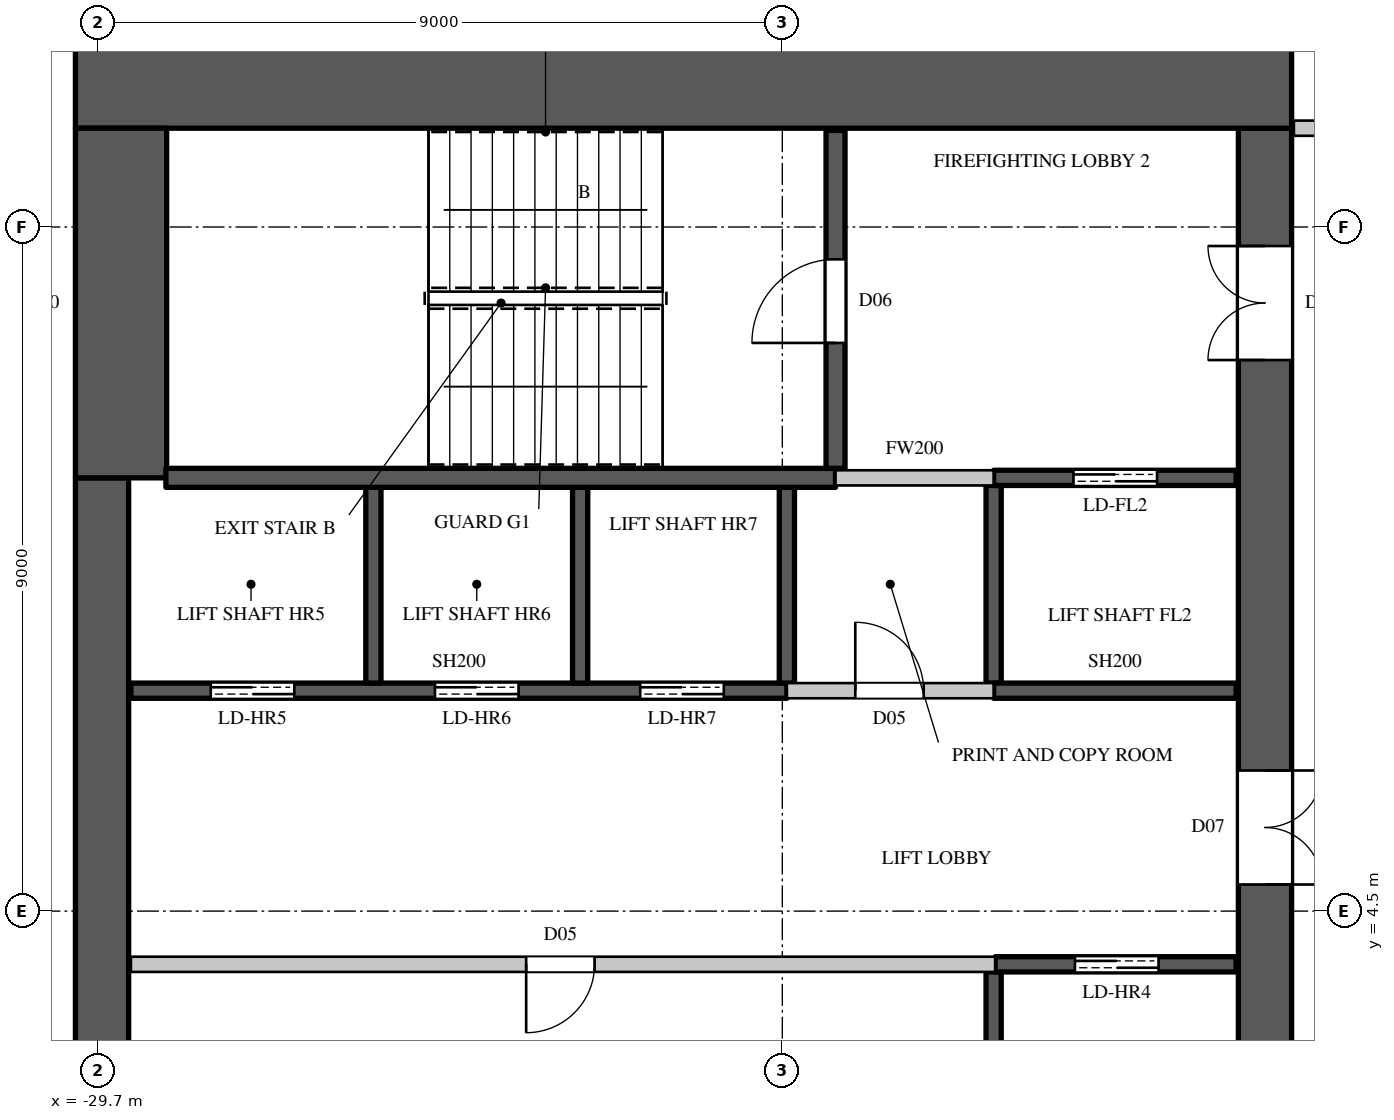
"""IFC4 building model, lengths in metres.
Left out: names, types, materials, properties, quantities, classifications, styles, units other than length and angle.
Written with IfcOpenShell. Run it as: python <this file> out.ifc"""

import sys

from ifc_helpers import new_model, si_unit, direction, frame, frame_2d, origin, place, context, subcontext, project, spatial, rectangle, extrude, element, fill, save


model = new_model("IFC4")
c1 = context("Model", 3, precision=1e-05, world=origin(), true_north=direction((0.0, 1.0)))
c2 = subcontext(c1, "Body", "Model", "MODEL_VIEW")
j1 = project(units=[si_unit("LENGTHUNIT", "METRE"), si_unit("PLANEANGLEUNIT", "RADIAN")], contexts=[c1])
p1 = place(None, origin())
s1 = spatial("IfcSite", under=j1, at=p1, CompositionType="ELEMENT")
p2 = place(p1, origin())
s2 = spatial("IfcBuilding", under=s1, at=p2, CompositionType="ELEMENT")
p3 = place(p2, frame((0.0, 0.0, 284.4)))
s3 = spatial("IfcBuildingStorey", under=s2, at=p3, CompositionType="ELEMENT", Elevation=284.4)
p4 = place(p3, frame((-30.0, 15.4, 0.0), z_axis=(0.0, 0.0, 1.0), x_axis=(1.0, 0.0, 0.0)))
e1 = element("IfcWall", 1, at=p4, inside=s3, PredefinedType="SHEAR", context=c2, shape_type="SweptSolid", body=[
    extrude(rectangle(XDim=16.0, YDim=1.2, at=frame_2d((8.0, 0.0))), origin(), (0.0, 0.0, 1.0), 4.1),
])
p5 = place(p3, frame((-14.35, -14.8, 0.0), z_axis=(0.0, 0.0, 1.0), x_axis=(0.0, 1.0, 0.0)))
e2 = element("IfcWall", 2, at=p5, inside=s3, PredefinedType="SHEAR", context=c2, shape_type="SweptSolid", body=[
    extrude(rectangle(XDim=29.6, YDim=0.7, at=frame_2d((14.8, 0.0))), origin(), (0.0, 0.0, 1.0), 4.1),
])
p6 = place(p5, frame((1.55, 0.0, 0.0)))
e3 = element("IfcOpeningElement", 3, at=p6, cuts=e2, PredefinedType="OPENING", context=c2, shape_type="SweptSolid", body=[
    extrude(rectangle(XDim=1.5, YDim=2.4, at=frame_2d((0.75, 1.2))), frame((0.0, 0.36, 0.0), z_axis=(0.0, -1.0, 0.0), x_axis=(1.0, 0.0, 0.0)), (0.0, 0.0, 1.0), 0.72),
])
p7 = place(p5, frame((26.55, 0.0, 0.0)))
e4 = element("IfcOpeningElement", 4, at=p7, cuts=e2, PredefinedType="OPENING", context=c2, shape_type="SweptSolid", body=[
    extrude(rectangle(XDim=1.5, YDim=2.4, at=frame_2d((0.75, 1.2))), frame((0.0, 0.36, 0.0), z_axis=(0.0, -1.0, 0.0), x_axis=(1.0, 0.0, 0.0)), (0.0, 0.0, 1.0), 0.72),
])
p8 = place(p5, frame((8.45, 0.0, 0.0)))
e5 = element("IfcOpeningElement", 5, at=p8, cuts=e2, PredefinedType="OPENING", context=c2, shape_type="SweptSolid", body=[
    extrude(rectangle(XDim=1.5, YDim=2.4, at=frame_2d((0.75, 1.2))), frame((0.0, 0.36, 0.0), z_axis=(0.0, -1.0, 0.0), x_axis=(1.0, 0.0, 0.0)), (0.0, 0.0, 1.0), 0.72),
])
p9 = place(p5, frame((19.65, 0.0, 0.0)))
e6 = element("IfcOpeningElement", 6, at=p9, cuts=e2, PredefinedType="OPENING", context=c2, shape_type="SweptSolid", body=[
    extrude(rectangle(XDim=1.5, YDim=2.4, at=frame_2d((0.75, 1.2))), frame((0.0, 0.36, 0.0), z_axis=(0.0, -1.0, 0.0), x_axis=(1.0, 0.0, 0.0)), (0.0, 0.0, 1.0), 0.72),
])
p10 = place(p5, frame((14.5, 0.0, 0.0)))
e7 = element("IfcOpeningElement", 7, at=p10, cuts=e2, PredefinedType="OPENING", context=c2, shape_type="SweptSolid", body=[
    extrude(rectangle(XDim=0.6, YDim=2.0, at=frame_2d((0.3, 1.0))), frame((0.0, 0.36, 0.0), z_axis=(0.0, -1.0, 0.0), x_axis=(1.0, 0.0, 0.0)), (0.0, 0.0, 1.0), 0.72),
])
p11 = place(p3, frame((-29.65, -10.2, 0.0), z_axis=(0.0, 0.0, 1.0), x_axis=(0.0, 1.0, 0.0)))
e8 = element("IfcWall", 8, at=p11, inside=s3, PredefinedType="SHEAR", context=c2, shape_type="SweptSolid", body=[
    extrude(rectangle(XDim=20.4, YDim=0.7, at=frame_2d((10.2, 0.0))), origin(), (0.0, 0.0, 1.0), 4.1),
])
p12 = place(p3, frame((-29.4, 10.2, 0.0), z_axis=(0.0, 0.0, 1.0), x_axis=(0.0, 1.0, 0.0)))
e9 = element("IfcWall", 9, at=p12, inside=s3, PredefinedType="SHEAR", context=c2, shape_type="SweptSolid", body=[
    extrude(rectangle(XDim=4.6, YDim=1.2, at=frame_2d((2.3, 0.0))), origin(), (0.0, 0.0, 1.0), 4.1),
])
p13 = place(p3, frame((-20.64, 7.4, 0.0), z_axis=(0.0, 0.0, 1.0), x_axis=(1.0, 0.0, 0.0)))
e10 = element("IfcWall", 10, at=p13, inside=s3, PredefinedType="PARTITIONING", context=c2, shape_type="SweptSolid", body=[
    extrude(rectangle(XDim=2.72, YDim=0.2, at=frame_2d((1.36, 0.0))), origin(), (0.0, 0.0, 1.0), 3.8),
])
p14 = place(p13, frame((0.9, 0.0, 0.0)))
e11 = element("IfcOpeningElement", 11, at=p14, cuts=e10, PredefinedType="OPENING", context=c2, shape_type="SweptSolid", body=[
    extrude(rectangle(XDim=0.9, YDim=2.2, at=frame_2d((0.45, 1.1))), frame((0.0, 0.11, 0.0), z_axis=(0.0, -1.0, 0.0), x_axis=(1.0, 0.0, 0.0)), (0.0, 0.0, 1.0), 0.22),
])
p15 = place(p3, frame((-20.0, 10.2, 0.0), z_axis=(0.0, 0.0, 1.0), x_axis=(1.0, 0.0, 0.0)))
e12 = element("IfcWall", 12, at=p15, inside=s3, PredefinedType="PARTITIONING", context=c2, shape_type="SweptSolid", body=[
    extrude(rectangle(XDim=2.08, YDim=0.2, at=frame_2d((1.04, 0.0))), origin(), (0.0, 0.0, 1.0), 3.8),
])
p16 = place(p3, frame((-13.97, 14.8, 0.0), z_axis=(0.0, 0.0, 1.0), x_axis=(1.0, 0.0, 0.0)))
e13 = element("IfcWall", 13, at=p16, inside=s3, PredefinedType="PARTITIONING", context=c2, shape_type="SweptSolid", body=[
    extrude(rectangle(XDim=2.87, YDim=0.2, at=frame_2d((1.435, 0.0))), origin(), (0.0, 0.0, 1.0), 3.8),
])
p17 = place(p3, frame((-29.27, 3.8, 0.0), z_axis=(0.0, 0.0, 1.0), x_axis=(1.0, 0.0, 0.0)))
e14 = element("IfcWall", 14, at=p17, inside=s3, PredefinedType="PARTITIONING", context=c2, shape_type="SweptSolid", body=[
    extrude(rectangle(XDim=11.37, YDim=0.2, at=frame_2d((5.685, 0.0))), origin(), (0.0, 0.0, 1.0), 3.8),
])
p18 = place(p17, frame((5.2, 0.0, 0.0)))
e15 = element("IfcOpeningElement", 15, at=p18, cuts=e14, PredefinedType="OPENING", context=c2, shape_type="SweptSolid", body=[
    extrude(rectangle(XDim=0.9, YDim=2.2, at=frame_2d((0.45, 1.1))), frame((0.0, 0.11, 0.0), z_axis=(0.0, -1.0, 0.0), x_axis=(1.0, 0.0, 0.0)), (0.0, 0.0, 1.0), 0.22),
])
p19 = place(p3, frame((-29.27, 7.4, 0.0), z_axis=(0.0, 0.0, 1.0), x_axis=(1.0, 0.0, 0.0)))
e16 = element("IfcWall", 16, at=p19, inside=s3, PredefinedType="SHEAR", context=c2, shape_type="SweptSolid", body=[
    extrude(rectangle(XDim=8.63, YDim=0.2, at=frame_2d((4.315, 0.0))), origin(), (0.0, 0.0, 1.0), 3.8),
])
p20 = place(p19, frame((1.05, 0.0, 0.0)))
e17 = element("IfcOpeningElement", 17, at=p20, cuts=e16, PredefinedType="OPENING", context=c2, shape_type="SweptSolid", body=[
    extrude(rectangle(XDim=1.1, YDim=2.2, at=frame_2d((0.55, 1.1))), frame((0.0, 0.11, 0.0), z_axis=(0.0, -1.0, 0.0), x_axis=(1.0, 0.0, 0.0)), (0.0, 0.0, 1.0), 0.22),
])
p21 = place(p19, frame((4.0, 0.0, 0.0)))
e18 = element("IfcOpeningElement", 18, at=p21, cuts=e16, PredefinedType="OPENING", context=c2, shape_type="SweptSolid", body=[
    extrude(rectangle(XDim=1.1, YDim=2.2, at=frame_2d((0.55, 1.1))), frame((0.0, 0.11, 0.0), z_axis=(0.0, -1.0, 0.0), x_axis=(1.0, 0.0, 0.0)), (0.0, 0.0, 1.0), 0.22),
])
p22 = place(p19, frame((6.7, 0.0, 0.0)))
e19 = element("IfcOpeningElement", 19, at=p22, cuts=e16, PredefinedType="OPENING", context=c2, shape_type="SweptSolid", body=[
    extrude(rectangle(XDim=1.1, YDim=2.2, at=frame_2d((0.55, 1.1))), frame((0.0, 0.11, 0.0), z_axis=(0.0, -1.0, 0.0), x_axis=(1.0, 0.0, 0.0)), (0.0, 0.0, 1.0), 0.22),
])
for number, where, z_axis, x_axis in (
    (20, (-26.08, 7.5, 0.0), (0.0, 0.0, 1.0), (0.0, 1.0, 0.0)),
    (21, (-23.36, 7.5, 0.0), (0.0, 0.0, 1.0), (0.0, 1.0, 0.0)),
):
    element("IfcWall", number, at=place(p3, frame(where, z_axis=z_axis, x_axis=x_axis)), inside=s3, PredefinedType="SHEAR", context=c2, shape_type="SweptSolid", body=[
        extrude(rectangle(XDim=2.575, YDim=0.2, at=frame_2d((1.288, 0.0))), origin(), (0.0, 0.0, 1.0), 4.1),
    ])
p23 = place(p3, frame((-20.64, 7.5, 0.0), z_axis=(0.0, 0.0, 1.0), x_axis=(0.0, 1.0, 0.0)))
e22 = element("IfcWall", 22, at=p23, inside=s3, PredefinedType="SHEAR", context=c2, shape_type="SweptSolid", body=[
    extrude(rectangle(XDim=2.575, YDim=0.2, at=frame_2d((1.288, 0.0))), origin(), (0.0, 0.0, 1.0), 3.8),
])
p24 = place(p3, frame((-17.92, 1.1, 0.0), z_axis=(0.0, 0.0, 1.0), x_axis=(0.0, 1.0, 0.0)))
e23 = element("IfcWall", 23, at=p24, inside=s3, PredefinedType="SHEAR", context=c2, shape_type="SweptSolid", body=[
    extrude(rectangle(XDim=2.6, YDim=0.2, at=frame_2d((1.3, 0.0))), origin(), (0.0, 0.0, 1.0), 3.8),
])
p25 = place(p3, frame((-17.9, 3.8, 0.0), z_axis=(0.0, 0.0, 1.0), x_axis=(1.0, 0.0, 0.0)))
e24 = element("IfcWall", 24, at=p25, inside=s3, PredefinedType="SHEAR", context=c2, shape_type="SweptSolid", body=[
    extrude(rectangle(XDim=3.17, YDim=0.2, at=frame_2d((1.585, 0.0))), origin(), (0.0, 0.0, 1.0), 3.8),
])
p26 = place(p25, frame((1.05, 0.0, 0.0)))
e25 = element("IfcOpeningElement", 25, at=p26, cuts=e24, PredefinedType="OPENING", context=c2, shape_type="SweptSolid", body=[
    extrude(rectangle(XDim=1.1, YDim=2.2, at=frame_2d((0.55, 1.1))), frame((0.0, 0.11, 0.0), z_axis=(0.0, -1.0, 0.0), x_axis=(1.0, 0.0, 0.0)), (0.0, 0.0, 1.0), 0.22),
])
p27 = place(p3, frame((-17.92, 7.5, 0.0), z_axis=(0.0, 0.0, 1.0), x_axis=(0.0, 1.0, 0.0)))
e26 = element("IfcWall", 26, at=p27, inside=s3, PredefinedType="SHEAR", context=c2, shape_type="SweptSolid", body=[
    extrude(rectangle(XDim=2.6, YDim=0.2, at=frame_2d((1.3, 0.0))), origin(), (0.0, 0.0, 1.0), 3.8),
])
p28 = place(p3, frame((-17.92, 7.4, 0.0), z_axis=(0.0, 0.0, 1.0), x_axis=(1.0, 0.0, 0.0)))
e27 = element("IfcWall", 27, at=p28, inside=s3, PredefinedType="SHEAR", context=c2, shape_type="SweptSolid", body=[
    extrude(rectangle(XDim=3.19, YDim=0.2, at=frame_2d((1.595, 0.0))), origin(), (0.0, 0.0, 1.0), 3.8),
])
p29 = place(p3, frame((-17.92, 10.2, 0.0), z_axis=(0.0, 0.0, 1.0), x_axis=(1.0, 0.0, 0.0)))
e28 = element("IfcWall", 28, at=p29, inside=s3, PredefinedType="SHEAR", context=c2, shape_type="SweptSolid", body=[
    extrude(rectangle(XDim=3.19, YDim=0.2, at=frame_2d((1.595, 0.0))), origin(), (0.0, 0.0, 1.0), 3.8),
])
p30 = place(p29, frame((1.05, 0.0, 0.0)))
e29 = element("IfcOpeningElement", 29, at=p30, cuts=e28, PredefinedType="OPENING", context=c2, shape_type="SweptSolid", body=[
    extrude(rectangle(XDim=1.1, YDim=2.2, at=frame_2d((0.55, 1.1))), frame((0.0, 0.11, 0.0), z_axis=(0.0, -1.0, 0.0), x_axis=(1.0, 0.0, 0.0)), (0.0, 0.0, 1.0), 0.22),
])
p31 = place(p3, frame((-28.81, 10.2, 0.0), z_axis=(0.0, 0.0, 1.0), x_axis=(1.0, 0.0, 0.0)))
e30 = element("IfcWall", 30, at=p31, inside=s3, PredefinedType="SHEAR", context=c2, shape_type="SweptSolid", body=[
    extrude(rectangle(XDim=8.81, YDim=0.25, at=frame_2d((4.405, 0.0))), origin(), (0.0, 0.0, 1.0), 3.8),
])
p32 = place(p3, frame((-20.0, 10.325, 0.0), z_axis=(0.0, 0.0, 1.0), x_axis=(0.0, 1.0, 0.0)))
e31 = element("IfcWall", 31, at=p32, inside=s3, PredefinedType="SHEAR", context=c2, shape_type="SweptSolid", body=[
    extrude(rectangle(XDim=4.445, YDim=0.25, at=frame_2d((2.223, 0.0))), origin(), (0.0, 0.0, 1.0), 3.8),
])
p33 = place(p32, frame((1.65, 0.0, 0.0)))
e32 = element("IfcOpeningElement", 32, at=p33, cuts=e31, PredefinedType="OPENING", context=c2, shape_type="SweptSolid", body=[
    extrude(rectangle(XDim=1.1, YDim=2.2, at=frame_2d((0.55, 1.1))), frame((0.0, 0.135, 0.0), z_axis=(0.0, -1.0, 0.0), x_axis=(1.0, 0.0, 0.0)), (0.0, 0.0, 1.0), 0.27),
])
p34 = place(p33, origin())
e33 = element("IfcDoor", 33, at=p34, inside=s3, OperationType="SINGLE_SWING_LEFT", PredefinedType="DOOR", context=c2, shape_type="SweptSolid", body=[
    extrude(rectangle(XDim=1.1, YDim=2.2, at=frame_2d((0.55, 1.1))), frame((0.0, 0.025, 0.0), z_axis=(0.0, -1.0, 0.0), x_axis=(1.0, 0.0, 0.0)), (0.0, 0.0, 1.0), 0.05),
])
fill(e32, e33)
p35 = place(p18, origin())
e34 = element("IfcDoor", 34, at=p35, inside=s3, OperationType="SINGLE_SWING_RIGHT", PredefinedType="DOOR", context=c2, shape_type="SweptSolid", body=[
    extrude(rectangle(XDim=0.9, YDim=2.2, at=frame_2d((0.45, 1.1))), frame((0.0, 0.025, 0.0), z_axis=(0.0, -1.0, 0.0), x_axis=(1.0, 0.0, 0.0)), (0.0, 0.0, 1.0), 0.05),
])
fill(e15, e34)
p36 = place(p14, origin())
e35 = element("IfcDoor", 35, at=p36, inside=s3, OperationType="SINGLE_SWING_LEFT", PredefinedType="DOOR", context=c2, shape_type="SweptSolid", body=[
    extrude(rectangle(XDim=0.9, YDim=2.2, at=frame_2d((0.45, 1.1))), frame((0.0, 0.025, 0.0), z_axis=(0.0, -1.0, 0.0), x_axis=(1.0, 0.0, 0.0)), (0.0, 0.0, 1.0), 0.05),
])
fill(e11, e35)
p37 = place(p26, origin())
e36 = element("IfcDoor", 36, at=p37, inside=s3, OperationType="DOUBLE_DOOR_SLIDING", PredefinedType="DOOR", context=c2, shape_type="SweptSolid", body=[
    extrude(rectangle(XDim=1.1, YDim=2.2, at=frame_2d((0.55, 1.1))), frame((0.0, 0.025, 0.0), z_axis=(0.0, -1.0, 0.0), x_axis=(1.0, 0.0, 0.0)), (0.0, 0.0, 1.0), 0.05),
])
fill(e25, e36)
p38 = place(p20, origin())
e37 = element("IfcDoor", 37, at=p38, inside=s3, OperationType="DOUBLE_DOOR_SLIDING", PredefinedType="DOOR", context=c2, shape_type="SweptSolid", body=[
    extrude(rectangle(XDim=1.1, YDim=2.2, at=frame_2d((0.55, 1.1))), frame((0.0, 0.025, 0.0), z_axis=(0.0, -1.0, 0.0), x_axis=(1.0, 0.0, 0.0)), (0.0, 0.0, 1.0), 0.05),
])
fill(e17, e37)
p39 = place(p21, origin())
e38 = element("IfcDoor", 38, at=p39, inside=s3, OperationType="DOUBLE_DOOR_SLIDING", PredefinedType="DOOR", context=c2, shape_type="SweptSolid", body=[
    extrude(rectangle(XDim=1.1, YDim=2.2, at=frame_2d((0.55, 1.1))), frame((0.0, 0.025, 0.0), z_axis=(0.0, -1.0, 0.0), x_axis=(1.0, 0.0, 0.0)), (0.0, 0.0, 1.0), 0.05),
])
fill(e18, e38)
p40 = place(p22, origin())
e39 = element("IfcDoor", 39, at=p40, inside=s3, OperationType="DOUBLE_DOOR_SLIDING", PredefinedType="DOOR", context=c2, shape_type="SweptSolid", body=[
    extrude(rectangle(XDim=1.1, YDim=2.2, at=frame_2d((0.55, 1.1))), frame((0.0, 0.025, 0.0), z_axis=(0.0, -1.0, 0.0), x_axis=(1.0, 0.0, 0.0)), (0.0, 0.0, 1.0), 0.05),
])
fill(e19, e39)
p41 = place(p30, origin())
e40 = element("IfcDoor", 40, at=p41, inside=s3, OperationType="DOUBLE_DOOR_SLIDING", PredefinedType="DOOR", context=c2, shape_type="SweptSolid", body=[
    extrude(rectangle(XDim=1.1, YDim=2.2, at=frame_2d((0.55, 1.1))), frame((0.0, 0.025, 0.0), z_axis=(0.0, -1.0, 0.0), x_axis=(1.0, 0.0, 0.0)), (0.0, 0.0, 1.0), 0.05),
])
fill(e29, e40)
p42 = place(p7, origin())
e41 = element("IfcDoor", 41, at=p42, inside=s3, OperationType="DOUBLE_DOOR_SINGLE_SWING", PredefinedType="DOOR", context=c2, shape_type="SweptSolid", body=[
    extrude(rectangle(XDim=1.5, YDim=2.4, at=frame_2d((0.75, 1.2))), frame((0.0, 0.345, 0.0), z_axis=(0.0, -1.0, 0.0), x_axis=(1.0, 0.0, 0.0)), (0.0, 0.0, 1.0), 0.05),
])
fill(e4, e41)
p43 = place(p9, origin())
e42 = element("IfcDoor", 42, at=p43, inside=s3, OperationType="DOUBLE_DOOR_SINGLE_SWING", PredefinedType="DOOR", context=c2, shape_type="SweptSolid", body=[
    extrude(rectangle(XDim=1.5, YDim=2.4, at=frame_2d((0.75, 1.2))), frame((0.0, -0.295, 0.0), z_axis=(0.0, -1.0, 0.0), x_axis=(1.0, 0.0, 0.0)), (0.0, 0.0, 1.0), 0.05),
])
fill(e6, e42)
save(model, sys.argv[1])
